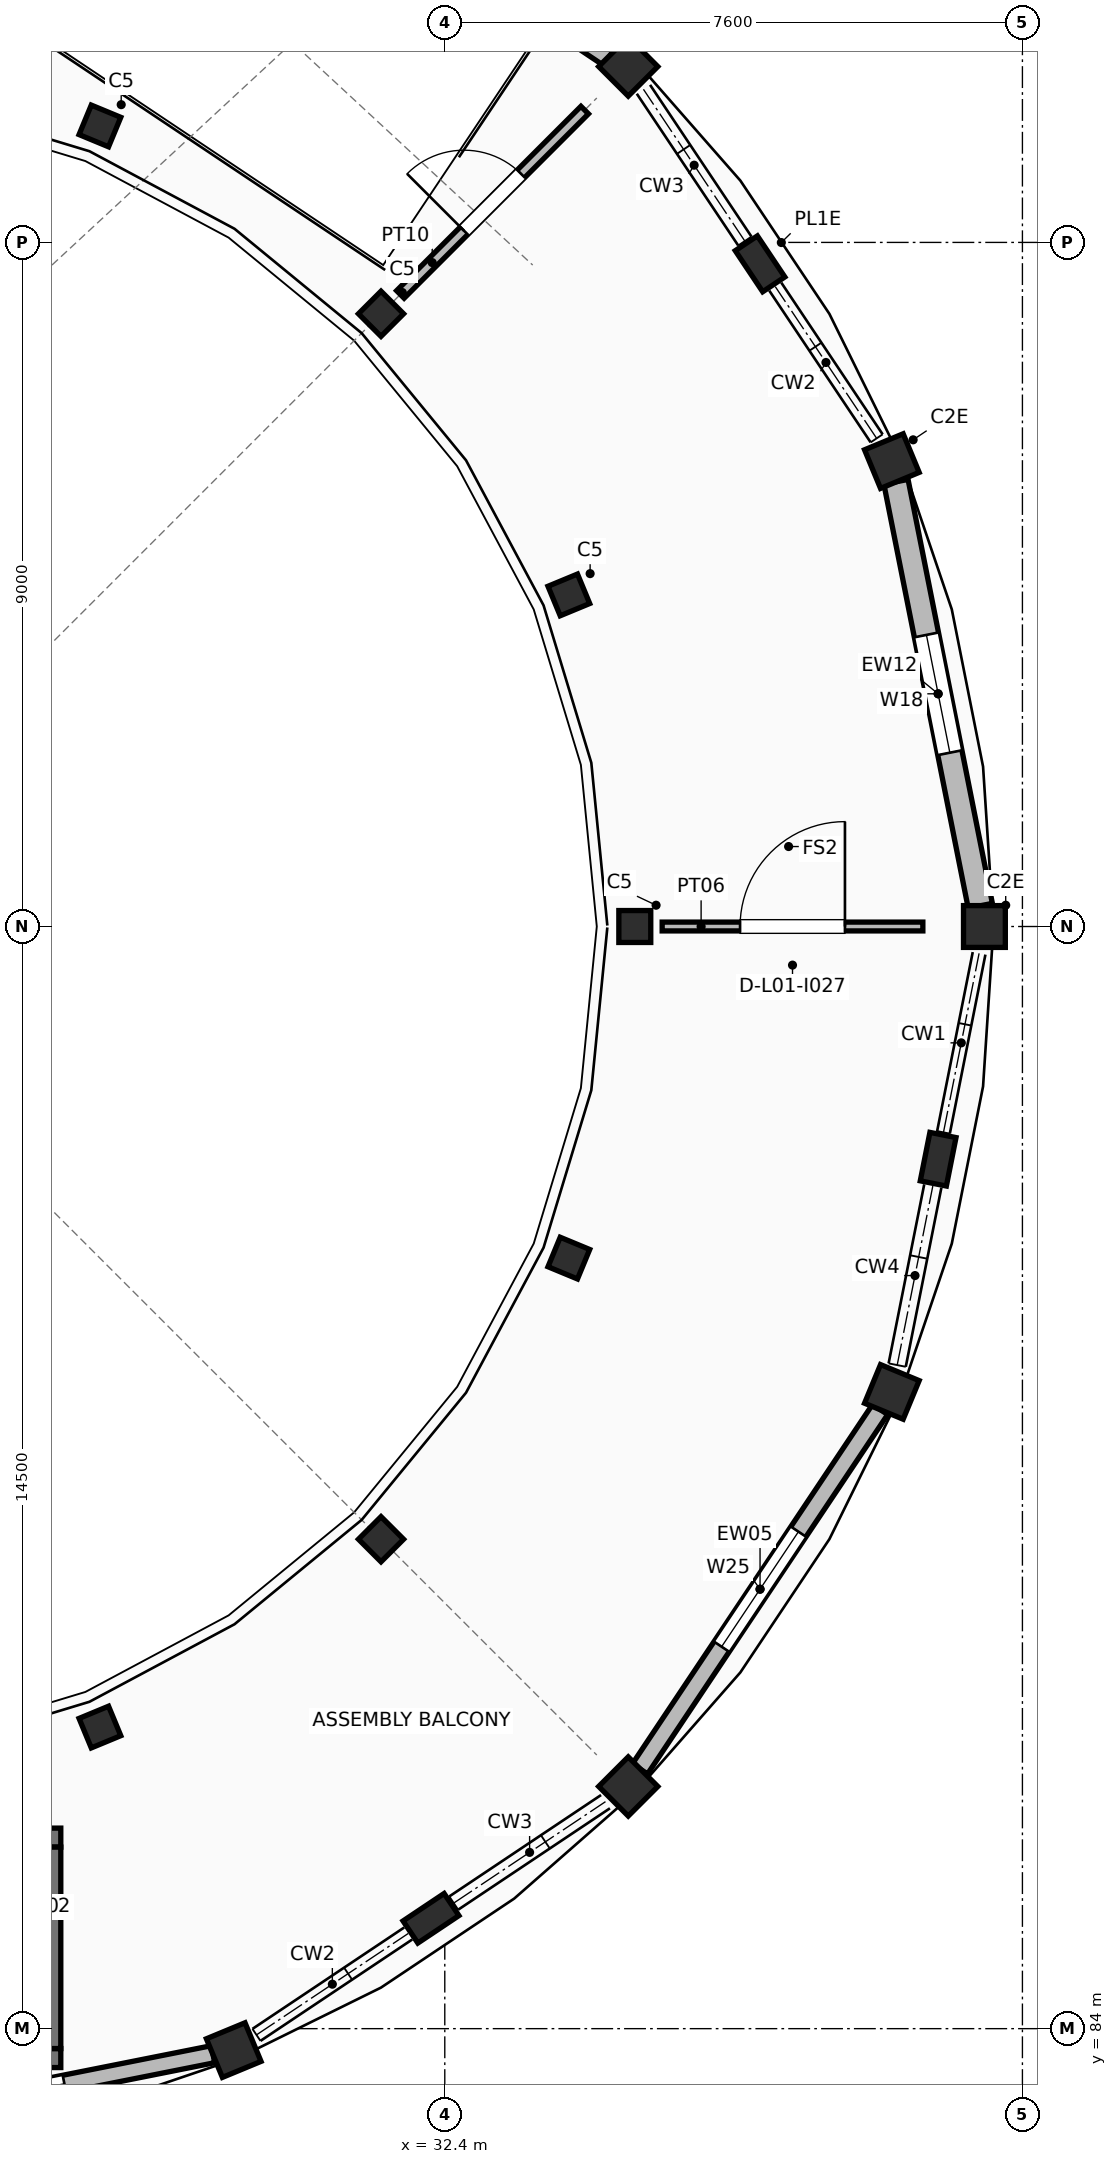
"""IFC4 building model, lengths in metres.
Left out: names, types, materials, properties, quantities, classifications, styles, units other than length and angle.
Written with IfcOpenShell. Run it as: python <this file> out.ifc"""

import sys

from ifc_helpers import new_model, si_unit, direction, frame, frame_2d, origin, origin_2d, place, context, subcontext, project, spatial, rectangle, extrude, element, fill, save


model = new_model("IFC4")
c1 = context("Model", 3, precision=1e-05, world=origin(), true_north=direction((0.0, 1.0)))
c2 = subcontext(c1, "Body", "Model", "MODEL_VIEW")
j1 = project(units=[si_unit("LENGTHUNIT", "METRE"), si_unit("PLANEANGLEUNIT", "RADIAN")], contexts=[c1])
p1 = place(None, origin())
s1 = spatial("IfcSite", under=j1, at=p1, CompositionType="ELEMENT")
p2 = place(p1, origin())
s2 = spatial("IfcBuilding", under=s1, at=p2, CompositionType="ELEMENT")
p3 = place(p2, frame((0.0, 0.0, 4.42)))
s3 = spatial("IfcBuildingStorey", under=s2, at=p3, CompositionType="ELEMENT", Elevation=4.42)
p4 = place(p3, frame((34.9, 98.5, 0.0), z_axis=(0.0, 0.0, 1.0), x_axis=(1.0, 0.0, 0.0)))
e1 = element("IfcColumn", 1, at=p4, inside=s3, PredefinedType="COLUMN", context=c2, shape_type="SweptSolid", body=[
    extrude(rectangle(XDim=0.42, YDim=0.42, at=origin_2d()), origin(), (0.0, 0.0, 1.0), 3.74),
])
p5 = place(p3, frame((39.5, 98.5, 0.0), z_axis=(0.0, 0.0, 1.0), x_axis=(1.0, 0.0, 0.0)))
e2 = element("IfcColumn", 2, at=p5, inside=s3, PredefinedType="COLUMN", context=c2, shape_type="SweptSolid", body=[
    extrude(rectangle(XDim=0.55, YDim=0.55, at=origin_2d()), origin(), (0.0, 0.0, 1.0), 3.74),
])
p6 = place(p3, frame((34.032, 102.863, 0.0), z_axis=(0.0, 0.0, 1.0), x_axis=(0.923879532511, 0.382683432365, 0.0)))
e3 = element("IfcColumn", 3, at=p6, inside=s3, PredefinedType="COLUMN", context=c2, shape_type="SweptSolid", body=[
    extrude(rectangle(XDim=0.42, YDim=0.42, at=origin_2d()), origin(), (0.0, 0.0, 1.0), 3.74),
])
p7 = place(p3, frame((38.282, 104.623, 0.0), z_axis=(0.0, 0.0, 1.0), x_axis=(0.923879532511, 0.382683432365, 0.0)))
e4 = element("IfcColumn", 4, at=p7, inside=s3, PredefinedType="COLUMN", context=c2, shape_type="SweptSolid", body=[
    extrude(rectangle(XDim=0.55, YDim=0.55, at=origin_2d()), origin(), (0.0, 0.0, 1.0), 3.74),
])
p8 = place(p3, frame((31.561, 106.561, 0.0), z_axis=(0.0, 0.0, 1.0), x_axis=(0.707106781187, 0.707106781187, 0.0)))
e5 = element("IfcColumn", 5, at=p8, inside=s3, PredefinedType="COLUMN", context=c2, shape_type="SweptSolid", body=[
    extrude(rectangle(XDim=0.42, YDim=0.42, at=origin_2d()), origin(), (0.0, 0.0, 1.0), 3.74),
])
p9 = place(p3, frame((34.814, 109.814, 0.0), z_axis=(0.0, 0.0, 1.0), x_axis=(0.707106781187, 0.707106781187, 0.0)))
e6 = element("IfcColumn", 6, at=p9, inside=s3, PredefinedType="COLUMN", context=c2, shape_type="SweptSolid", body=[
    extrude(rectangle(XDim=0.55, YDim=0.55, at=origin_2d()), origin(), (0.0, 0.0, 1.0), 3.74),
])
for number, where, z_axis, x_axis in (
    (7, (27.863, 109.032, 0.0), (0.0, 0.0, 1.0), (0.383, 0.924, 0.0)),
    (8, (27.863, 87.968, 0.0), (0.0, 0.0, 1.0), (0.383, -0.924, 0.0)),
):
    element("IfcColumn", number, at=place(p3, frame(where, z_axis=z_axis, x_axis=x_axis)), inside=s3, PredefinedType="COLUMN", context=c2, shape_type="SweptSolid", body=[
        extrude(rectangle(XDim=0.42, YDim=0.42, at=origin_2d()), origin(), (0.0, 0.0, 1.0), 3.74),
    ])
p10 = place(p3, frame((29.623, 83.718, 0.0), z_axis=(0.0, 0.0, 1.0), x_axis=(0.382683432365, -0.923879532511, 0.0)))
e9 = element("IfcColumn", 9, at=p10, inside=s3, PredefinedType="COLUMN", context=c2, shape_type="SweptSolid", body=[
    extrude(rectangle(XDim=0.55, YDim=0.55, at=origin_2d()), origin(), (0.0, 0.0, 1.0), 3.74),
])
p11 = place(p3, frame((31.561, 90.439, 0.0), z_axis=(0.0, 0.0, 1.0), x_axis=(0.707106781187, -0.707106781187, 0.0)))
e10 = element("IfcColumn", 10, at=p11, inside=s3, PredefinedType="COLUMN", context=c2, shape_type="SweptSolid", body=[
    extrude(rectangle(XDim=0.42, YDim=0.42, at=origin_2d()), origin(), (0.0, 0.0, 1.0), 3.74),
])
p12 = place(p3, frame((34.814, 87.186, 0.0), z_axis=(0.0, 0.0, 1.0), x_axis=(0.707106781187, -0.707106781187, 0.0)))
e11 = element("IfcColumn", 11, at=p12, inside=s3, PredefinedType="COLUMN", context=c2, shape_type="SweptSolid", body=[
    extrude(rectangle(XDim=0.55, YDim=0.55, at=origin_2d()), origin(), (0.0, 0.0, 1.0), 3.74),
])
p13 = place(p3, frame((34.032, 94.137, 0.0), z_axis=(0.0, 0.0, 1.0), x_axis=(0.923879532511, -0.382683432365, 0.0)))
e12 = element("IfcColumn", 12, at=p13, inside=s3, PredefinedType="COLUMN", context=c2, shape_type="SweptSolid", body=[
    extrude(rectangle(XDim=0.42, YDim=0.42, at=origin_2d()), origin(), (0.0, 0.0, 1.0), 3.74),
])
p14 = place(p3, frame((38.282, 92.377, 0.0), z_axis=(0.0, 0.0, 1.0), x_axis=(0.923879532511, -0.382683432365, 0.0)))
e13 = element("IfcColumn", 13, at=p14, inside=s3, PredefinedType="COLUMN", context=c2, shape_type="SweptSolid", body=[
    extrude(rectangle(XDim=0.55, YDim=0.55, at=origin_2d()), origin(), (0.0, 0.0, 1.0), 3.74),
])
for number, where, z_axis, x_axis in (
    (14, (36.548, 107.218, 0.0), (0.0, 0.0, 1.0), (0.831, 0.556, 0.0)),
    (15, (32.218, 85.452, 0.0), (0.0, 0.0, 1.0), (0.556, -0.831, 0.0)),
    (16, (38.891, 95.438, 0.0), (0.0, 0.0, 1.0), (0.981, -0.195, 0.0)),
):
    element("IfcColumn", number, at=place(p3, frame(where, z_axis=z_axis, x_axis=x_axis)), inside=s3, PredefinedType="PILASTER", context=c2, shape_type="SweptSolid", body=[
        extrude(rectangle(XDim=0.35, YDim=0.65, at=origin_2d()), origin(), (0.0, 0.0, 1.0), 3.74),
    ])
p15 = place(p3, frame((24.998, 86.513, 0.0), z_axis=(0.0, 0.0, 1.0), x_axis=(1.0, 0.0, 0.0)))
e17 = element("IfcWall", 17, at=p15, inside=s3, PredefinedType="SHEAR", context=c2, shape_type="SweptSolid", body=[
    extrude(rectangle(XDim=2.35, YDim=0.25, at=frame_2d((1.175, 0.0))), origin(), (0.0, 0.0, 1.0), 3.49),
])
p16 = place(p15, frame((0.625, 0.0, 0.0)))
e18 = element("IfcOpeningElement", 18, at=p16, cuts=e17, PredefinedType="OPENING", context=c2, shape_type="SweptSolid", body=[
    extrude(rectangle(XDim=1.1, YDim=2.15, at=frame_2d((0.55, 1.075))), frame((0.0, 0.135, 0.0), z_axis=(0.0, -1.0, 0.0), x_axis=(1.0, 0.0, 0.0)), (0.0, 0.0, 1.0), 0.27),
])
p17 = place(p3, frame((24.998, 83.613, 0.0), z_axis=(0.0, 0.0, 1.0), x_axis=(1.0, 0.0, 0.0)))
e19 = element("IfcWall", 19, at=p17, inside=s3, PredefinedType="SHEAR", context=c2, shape_type="SweptSolid", body=[
    extrude(rectangle(XDim=2.35, YDim=0.25, at=frame_2d((1.175, 0.0))), origin(), (0.0, 0.0, 1.0), 3.49),
])
p18 = place(p3, frame((27.223, 83.738, 0.0), z_axis=(0.0, 0.0, 1.0), x_axis=(0.0, 1.0, 0.0)))
e20 = element("IfcWall", 20, at=p18, inside=s3, PredefinedType="SHEAR", context=c2, shape_type="SweptSolid", body=[
    extrude(rectangle(XDim=2.65, YDim=0.25, at=frame_2d((1.325, 0.0))), origin(), (0.0, 0.0, 1.0), 3.49),
])
p19 = place(p3, frame((39.446, 98.773, 0.0), z_axis=(0.0, 0.0, 1.0), x_axis=(-0.195075787902, 0.980788171306, 0.0)))
e21 = element("IfcWall", 21, at=p19, inside=s3, PredefinedType="STANDARD", context=c2, shape_type="SweptSolid", body=[
    extrude(rectangle(XDim=5.687, YDim=0.324, at=frame_2d((2.844, 0.0))), origin(), (0.0, 0.0, 1.0), 2.78),
])
p20 = place(p19, frame((2.053, 0.0, 0.95)))
e22 = element("IfcOpeningElement", 22, at=p20, cuts=e21, PredefinedType="OPENING", context=c2, shape_type="SweptSolid", body=[
    extrude(rectangle(XDim=1.58, YDim=1.3, at=frame_2d((0.79, 0.65))), frame((0.0, 0.172, 0.0), z_axis=(0.0, -1.0, 0.0), x_axis=(1.0, 0.0, 0.0)), (0.0, 0.0, 1.0), 0.344),
])
p21 = place(p3, frame((34.583, 109.968, 0.0), z_axis=(0.0, 0.0, 1.0), x_axis=(-0.831475241541, 0.555561808177, 0.0)))
e23 = element("IfcWall", 23, at=p21, inside=s3, PredefinedType="STANDARD", context=c2, shape_type="SweptSolid", body=[
    extrude(rectangle(XDim=5.687, YDim=0.336, at=frame_2d((2.844, 0.0))), origin(), (0.0, 0.0, 1.0), 2.78),
])
p22 = place(p21, frame((2.053, 0.0, 0.95)))
e24 = element("IfcOpeningElement", 24, at=p22, cuts=e23, PredefinedType="OPENING", context=c2, shape_type="SweptSolid", body=[
    extrude(rectangle(XDim=1.58, YDim=1.45, at=frame_2d((0.79, 0.725))), frame((0.0, 0.178, 0.0), z_axis=(0.0, -1.0, 0.0), x_axis=(1.0, 0.0, 0.0)), (0.0, 0.0, 1.0), 0.356),
])
p23 = place(p3, frame((23.773, 82.554, 0.0), z_axis=(0.0, 0.0, 1.0), x_axis=(0.980788171306, 0.195075787902, 0.0)))
e25 = element("IfcWall", 25, at=p23, inside=s3, PredefinedType="STANDARD", context=c2, shape_type="SweptSolid", body=[
    extrude(rectangle(XDim=5.687, YDim=0.228, at=frame_2d((2.844, 0.0))), origin(), (0.0, 0.0, 1.0), 2.78),
])
p24 = place(p23, frame((1.993, 0.0, 0.95)))
e26 = element("IfcOpeningElement", 26, at=p24, cuts=e25, PredefinedType="OPENING", context=c2, shape_type="SweptSolid", body=[
    extrude(rectangle(XDim=1.7, YDim=1.6, at=frame_2d((0.85, 0.8))), frame((0.0, 0.124, 0.0), z_axis=(0.0, -1.0, 0.0), x_axis=(1.0, 0.0, 0.0)), (0.0, 0.0, 1.0), 0.248),
])
p25 = place(p3, frame((34.968, 87.417, 0.0), z_axis=(0.0, 0.0, 1.0), x_axis=(0.555561808177, 0.831475241541, 0.0)))
e27 = element("IfcWall", 27, at=p25, inside=s3, PredefinedType="STANDARD", context=c2, shape_type="SweptSolid", body=[
    extrude(rectangle(XDim=5.687, YDim=0.24, at=frame_2d((2.844, 0.0))), origin(), (0.0, 0.0, 1.0), 2.78),
])
p26 = place(p25, frame((1.933, 0.0, 0.95)))
e28 = element("IfcOpeningElement", 28, at=p26, cuts=e27, PredefinedType="OPENING", context=c2, shape_type="SweptSolid", body=[
    extrude(rectangle(XDim=1.82, YDim=1.15, at=frame_2d((0.91, 0.575))), frame((0.0, 0.13, 0.0), z_axis=(0.0, -1.0, 0.0), x_axis=(1.0, 0.0, 0.0)), (0.0, 0.0, 1.0), 0.26),
])
p27 = place(p3, frame((35.26, 98.5, 0.0), z_axis=(0.0, 0.0, 1.0), x_axis=(1.0, 0.0, 0.0)))
e29 = element("IfcWall", 29, at=p27, inside=s3, PredefinedType="PARTITIONING", context=c2, shape_type="SweptSolid", body=[
    extrude(rectangle(XDim=3.43, YDim=0.116, at=frame_2d((1.715, 0.0))), origin(), (0.0, 0.0, 1.0), 2.75),
])
p28 = place(p27, frame((1.025, 0.0, 0.0)))
e30 = element("IfcOpeningElement", 30, at=p28, cuts=e29, PredefinedType="OPENING", context=c2, shape_type="SweptSolid", body=[
    extrude(rectangle(XDim=1.38, YDim=2.24, at=frame_2d((0.69, 1.12))), frame((0.0, 0.068, 0.0), z_axis=(0.0, -1.0, 0.0), x_axis=(1.0, 0.0, 0.0)), (0.0, 0.0, 1.0), 0.136),
])
p29 = place(p3, frame((31.816, 106.816, 0.0), z_axis=(0.0, 0.0, 1.0), x_axis=(0.707106781187, 0.707106781187, 0.0)))
e31 = element("IfcWall", 31, at=p29, inside=s3, PredefinedType="PARTITIONING", context=c2, shape_type="SweptSolid", body=[
    extrude(rectangle(XDim=3.43, YDim=0.14, at=frame_2d((1.715, 0.0))), origin(), (0.0, 0.0, 1.0), 2.75),
])
p30 = place(p29, frame((1.185, 0.0, 0.0)))
e32 = element("IfcOpeningElement", 32, at=p30, cuts=e31, PredefinedType="OPENING", context=c2, shape_type="SweptSolid", body=[
    extrude(rectangle(XDim=1.06, YDim=2.18, at=frame_2d((0.53, 1.09))), frame((0.0, 0.08, 0.0), z_axis=(0.0, -1.0, 0.0), x_axis=(1.0, 0.0, 0.0)), (0.0, 0.0, 1.0), 0.16),
])
p31 = place(p20, origin())
e33 = element("IfcWindow", 33, at=p31, inside=s3, PartitioningType="SINGLE_PANEL", PredefinedType="WINDOW", context=c2, shape_type="SweptSolid", body=[
    extrude(rectangle(XDim=1.58, YDim=1.3, at=frame_2d((0.79, 0.65))), frame((0.0, 0.03, 0.0), z_axis=(0.0, -1.0, 0.0), x_axis=(1.0, 0.0, 0.0)), (0.0, 0.0, 1.0), 0.06),
])
fill(e22, e33)
p32 = place(p24, origin())
e34 = element("IfcWindow", 34, at=p32, inside=s3, PartitioningType="SINGLE_PANEL", PredefinedType="WINDOW", context=c2, shape_type="SweptSolid", body=[
    extrude(rectangle(XDim=1.7, YDim=1.6, at=frame_2d((0.85, 0.8))), frame((0.0, 0.03, 0.0), z_axis=(0.0, -1.0, 0.0), x_axis=(1.0, 0.0, 0.0)), (0.0, 0.0, 1.0), 0.06),
])
fill(e26, e34)
p33 = place(p26, origin())
e35 = element("IfcWindow", 35, at=p33, inside=s3, PartitioningType="SINGLE_PANEL", PredefinedType="WINDOW", context=c2, shape_type="SweptSolid", body=[
    extrude(rectangle(XDim=1.82, YDim=1.15, at=frame_2d((0.91, 0.575))), frame((0.0, 0.03, 0.0), z_axis=(0.0, -1.0, 0.0), x_axis=(1.0, 0.0, 0.0)), (0.0, 0.0, 1.0), 0.06),
])
fill(e28, e35)
p34 = place(p28, frame((1.38, 0.0, 0.0), z_axis=(0.0, 0.0, 1.0), x_axis=(-1.0, 0.0, 0.0)))
e36 = element("IfcDoor", 36, at=p34, inside=s3, OperationType="SINGLE_SWING_RIGHT", PredefinedType="DOOR", context=c2, shape_type="SweptSolid", body=[
    extrude(rectangle(XDim=1.38, YDim=2.24, at=frame_2d((0.69, 1.12))), frame((0.0, 0.025, 0.0), z_axis=(0.0, -1.0, 0.0), x_axis=(1.0, 0.0, 0.0)), (0.0, 0.0, 1.0), 0.05),
])
fill(e30, e36)
p35 = place(p30, origin())
e37 = element("IfcDoor", 37, at=p35, inside=s3, OperationType="SINGLE_SWING_LEFT", PredefinedType="DOOR", context=c2, shape_type="SweptSolid", body=[
    extrude(rectangle(XDim=1.06, YDim=2.18, at=frame_2d((0.53, 1.09))), frame((0.0, 0.025, 0.0), z_axis=(0.0, -1.0, 0.0), x_axis=(1.0, 0.0, 0.0)), (0.0, 0.0, 1.0), 0.05),
])
fill(e32, e37)
save(model, sys.argv[1])
